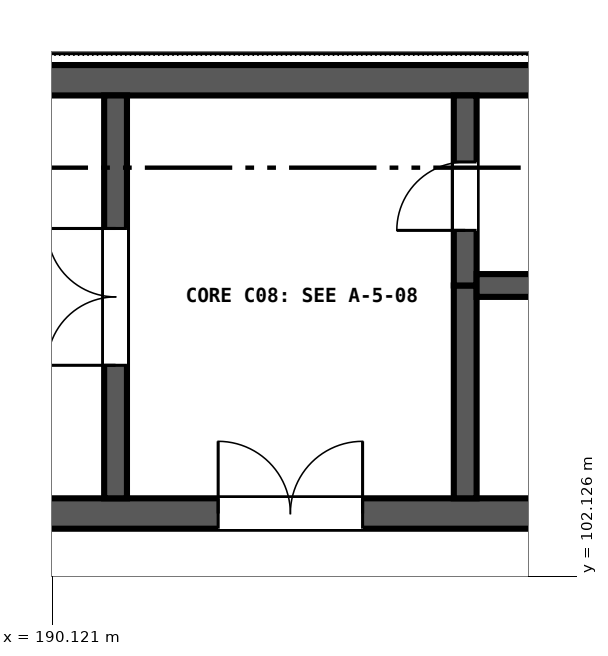
"""IFC4 building model, lengths in metres.
Left out: names, types, materials, properties, quantities, classifications, styles, units other than length and angle.
Written with IfcOpenShell. Run it as: python <this file> out.ifc"""

import sys

from ifc_helpers import new_model, si_unit, direction, frame, frame_2d, origin, place, context, subcontext, project, spatial, rectangle, extrude, element, fill, save


model = new_model("IFC4")
c1 = context("Model", 3, precision=1e-05, world=origin(), true_north=direction((0.0, 1.0)))
c2 = subcontext(c1, "Body", "Model", "MODEL_VIEW")
j1 = project(units=[si_unit("LENGTHUNIT", "METRE"), si_unit("PLANEANGLEUNIT", "RADIAN")], contexts=[c1])
p1 = place(None, origin())
s1 = spatial("IfcSite", under=j1, at=p1, CompositionType="ELEMENT")
p2 = place(p1, origin())
s2 = spatial("IfcBuilding", under=s1, at=p2, CompositionType="ELEMENT")
p3 = place(p2, origin())
s3 = spatial("IfcBuildingStorey", under=s2, at=p3, CompositionType="ELEMENT", Elevation=0.0)
p4 = place(p3, frame((180.9, 102.95, 0.0), z_axis=(0.0, 0.0, 1.0), x_axis=(1.0, 0.0, 0.0)))
e1 = element("IfcWall", 1, at=p4, inside=s3, PredefinedType="SHEAR", context=c2, shape_type="SweptSolid", body=[
    extrude(rectangle(XDim=18.0, YDim=0.4, at=frame_2d((9.0, 0.0))), origin(), (0.0, 0.0, 1.0), 4.5),
])
p5 = place(p4, frame((11.4, 0.0, 0.0)))
e2 = element("IfcOpeningElement", 2, at=p5, cuts=e1, PredefinedType="OPENING", context=c2, shape_type="SweptSolid", body=[
    extrude(rectangle(XDim=1.9, YDim=2.25, at=frame_2d((0.95, 1.125))), frame((0.0, 0.21, 0.0), z_axis=(0.0, -1.0, 0.0), x_axis=(1.0, 0.0, 0.0)), (0.0, 0.0, 1.0), 0.42),
])
p6 = place(p3, frame((198.9, 108.65, 0.0), z_axis=(0.0, 0.0, 1.0), x_axis=(-1.0, 0.0, 0.0)))
e3 = element("IfcWall", 3, at=p6, inside=s3, PredefinedType="SHEAR", context=c2, shape_type="SweptSolid", body=[
    extrude(rectangle(XDim=18.0, YDim=0.4, at=frame_2d((9.0, 0.0))), origin(), (0.0, 0.0, 1.0), 4.5),
])
p7 = place(p3, frame((190.95, 103.15, 0.0), z_axis=(0.0, 0.0, 1.0), x_axis=(0.0, 1.0, 0.0)))
e4 = element("IfcWall", 4, at=p7, inside=s3, PredefinedType="SHEAR", context=c2, shape_type="SweptSolid", body=[
    extrude(rectangle(XDim=5.3, YDim=0.3, at=frame_2d((2.65, 0.0))), origin(), (0.0, 0.0, 1.0), 4.5),
])
p8 = place(p7, frame((1.75, 0.0, 0.0)))
e5 = element("IfcOpeningElement", 5, at=p8, cuts=e4, PredefinedType="OPENING", context=c2, shape_type="SweptSolid", body=[
    extrude(rectangle(XDim=1.8, YDim=2.25, at=frame_2d((0.9, 1.125))), frame((0.0, 0.16, 0.0), z_axis=(0.0, -1.0, 0.0), x_axis=(1.0, 0.0, 0.0)), (0.0, 0.0, 1.0), 0.32),
])
p9 = place(p3, frame((195.55, 103.15, 0.0), z_axis=(0.0, 0.0, 1.0), x_axis=(0.0, 1.0, 0.0)))
e6 = element("IfcWall", 6, at=p9, inside=s3, PredefinedType="SHEAR", context=c2, shape_type="SweptSolid", body=[
    extrude(rectangle(XDim=2.8, YDim=0.3, at=frame_2d((1.4, 0.0))), origin(), (0.0, 0.0, 1.0), 4.5),
])
p10 = place(p3, frame((195.55, 105.95, 0.0), z_axis=(0.0, 0.0, 1.0), x_axis=(0.0, 1.0, 0.0)))
e7 = element("IfcWall", 7, at=p10, inside=s3, PredefinedType="SHEAR", context=c2, shape_type="SweptSolid", body=[
    extrude(rectangle(XDim=2.5, YDim=0.3, at=frame_2d((1.25, 0.0))), origin(), (0.0, 0.0, 1.0), 4.5),
])
p11 = place(p10, frame((0.725, 0.0, 0.0)))
e8 = element("IfcOpeningElement", 8, at=p11, cuts=e7, PredefinedType="OPENING", context=c2, shape_type="SweptSolid", body=[
    extrude(rectangle(XDim=0.9, YDim=2.1, at=frame_2d((0.45, 1.05))), frame((0.0, 0.16, 0.0), z_axis=(0.0, -1.0, 0.0), x_axis=(1.0, 0.0, 0.0)), (0.0, 0.0, 1.0), 0.32),
])
p12 = place(p3, frame((195.7, 105.95, 0.0), z_axis=(0.0, 0.0, 1.0), x_axis=(1.0, 0.0, 0.0)))
e9 = element("IfcWall", 9, at=p12, inside=s3, PredefinedType="SHEAR", context=c2, shape_type="SweptSolid", body=[
    extrude(rectangle(XDim=2.85, YDim=0.3, at=frame_2d((1.425, 0.0))), origin(), (0.0, 0.0, 1.0), 4.5),
])
p13 = place(p8, origin())
e10 = element("IfcDoor", 10, at=p13, inside=s3, OperationType="DOUBLE_DOOR_SINGLE_SWING", PredefinedType="DOOR", context=c2, shape_type="SweptSolid", body=[
    extrude(rectangle(XDim=1.8, YDim=2.25, at=frame_2d((0.9, 1.125))), frame((0.0, 0.025, 0.0), z_axis=(0.0, -1.0, 0.0), x_axis=(1.0, 0.0, 0.0)), (0.0, 0.0, 1.0), 0.05),
])
fill(e5, e10)
p14 = place(p11, origin())
e11 = element("IfcDoor", 11, at=p14, inside=s3, OperationType="SINGLE_SWING_LEFT", PredefinedType="DOOR", context=c2, shape_type="SweptSolid", body=[
    extrude(rectangle(XDim=0.9, YDim=2.1, at=frame_2d((0.45, 1.05))), frame((0.0, 0.025, 0.0), z_axis=(0.0, -1.0, 0.0), x_axis=(1.0, 0.0, 0.0)), (0.0, 0.0, 1.0), 0.05),
])
fill(e8, e11)
p15 = place(p5, origin())
e12 = element("IfcDoor", 12, at=p15, inside=s3, OperationType="DOUBLE_DOOR_SINGLE_SWING", PredefinedType="DOOR", context=c2, shape_type="SweptSolid", body=[
    extrude(rectangle(XDim=1.9, YDim=2.25, at=frame_2d((0.95, 1.125))), frame((0.0, 0.025, 0.0), z_axis=(0.0, -1.0, 0.0), x_axis=(1.0, 0.0, 0.0)), (0.0, 0.0, 1.0), 0.05),
])
fill(e2, e12)
save(model, sys.argv[1])
